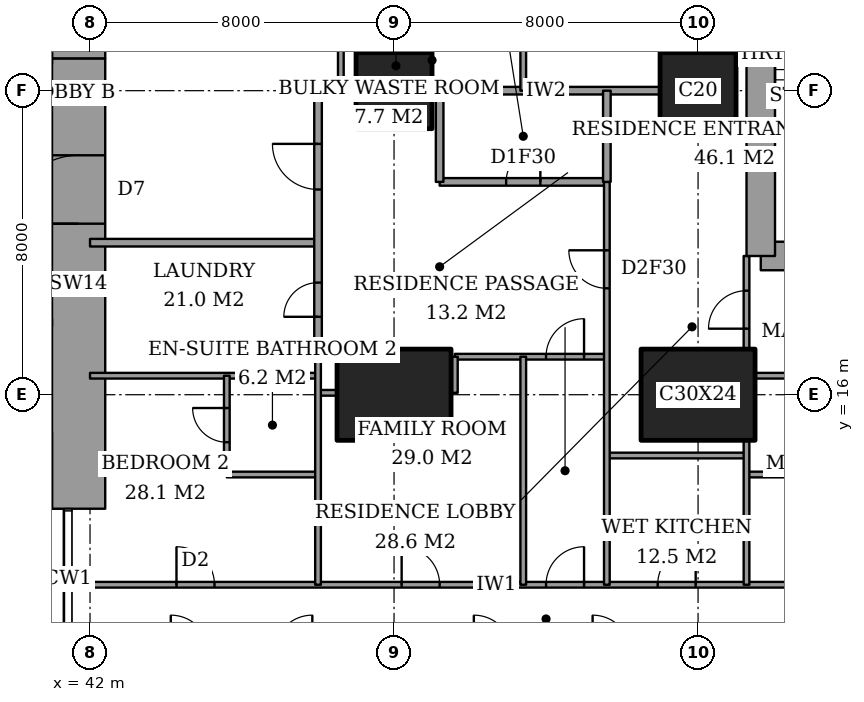
"""IFC4 building model, lengths in metres.
Left out: names, types, materials, properties, quantities, classifications, styles, units other than length and angle.
Written with IfcOpenShell. Run it as: python <this file> out.ifc"""

import sys

from ifc_helpers import new_model, si_unit, direction, frame, frame_2d, origin, origin_2d, place, context, subcontext, project, spatial, rectangle, extrude, element, fill, save


model = new_model("IFC4")
c1 = context("Model", 3, precision=1e-05, world=origin(), true_north=direction((0.0, 1.0)))
c2 = subcontext(c1, "Body", "Model", "MODEL_VIEW")
j1 = project(units=[si_unit("LENGTHUNIT", "METRE"), si_unit("PLANEANGLEUNIT", "RADIAN")], contexts=[c1])
p1 = place(None, origin())
s1 = spatial("IfcSite", under=j1, at=p1, CompositionType="ELEMENT")
p2 = place(p1, origin())
s2 = spatial("IfcBuilding", under=s1, at=p2, CompositionType="ELEMENT")
p3 = place(p2, frame((0.0, 0.0, 121.4)))
s3 = spatial("IfcBuildingStorey", under=s2, at=p3, CompositionType="ELEMENT", Elevation=121.4)
p4 = place(p3, frame((50.0, 16.0, 0.0), z_axis=(0.0, 0.0, 1.0), x_axis=(1.0, 0.0, 0.0)))
e1 = element("IfcColumn", 1, at=p4, inside=s3, PredefinedType="COLUMN", context=c2, shape_type="SweptSolid", body=[
    extrude(rectangle(XDim=3.0, YDim=2.4, at=origin_2d()), origin(), (0.0, 0.0, 1.0), 3.6),
])
p5 = place(p3, frame((50.0, 24.0, 0.0), z_axis=(0.0, 0.0, 1.0), x_axis=(1.0, 0.0, 0.0)))
e2 = element("IfcColumn", 2, at=p5, inside=s3, PredefinedType="COLUMN", context=c2, shape_type="SweptSolid", body=[
    extrude(rectangle(XDim=2.0, YDim=2.0, at=origin_2d()), origin(), (0.0, 0.0, 1.0), 3.6),
])
p6 = place(p3, frame((58.0, 16.0, 0.0), z_axis=(0.0, 0.0, 1.0), x_axis=(1.0, 0.0, 0.0)))
e3 = element("IfcColumn", 3, at=p6, inside=s3, PredefinedType="COLUMN", context=c2, shape_type="SweptSolid", body=[
    extrude(rectangle(XDim=3.0, YDim=2.4, at=origin_2d()), origin(), (0.0, 0.0, 1.0), 3.6),
])
p7 = place(p3, frame((58.0, 24.0, 0.0), z_axis=(0.0, 0.0, 1.0), x_axis=(1.0, 0.0, 0.0)))
e4 = element("IfcColumn", 4, at=p7, inside=s3, PredefinedType="COLUMN", context=c2, shape_type="SweptSolid", body=[
    extrude(rectangle(XDim=2.0, YDim=2.0, at=origin_2d()), origin(), (0.0, 0.0, 1.0), 3.6),
])
p8 = place(p3, frame((41.7, 13.0, 0.0), z_axis=(0.0, 0.0, 1.0), x_axis=(0.0, 1.0, 0.0)))
e5 = element("IfcWall", 5, at=p8, inside=s3, PredefinedType="SHEAR", context=c2, shape_type="SweptSolid", body=[
    extrude(rectangle(XDim=11.85, YDim=1.4, at=frame_2d((5.925, 0.0))), origin(), (0.0, 0.0, 1.0), 3.6),
])
p9 = place(p8, frame((7.5, 0.0, 0.0)))
e6 = element("IfcOpeningElement", 6, at=p9, cuts=e5, PredefinedType="OPENING", context=c2, shape_type="SweptSolid", body=[
    extrude(rectangle(XDim=1.8, YDim=2.4, at=frame_2d((0.9, 1.2))), frame((0.0, 0.71, 0.0), z_axis=(0.0, -1.0, 0.0), x_axis=(1.0, 0.0, 0.0)), (0.0, 0.0, 1.0), 1.42),
])
p10 = place(p3, frame((41.7, 24.85, 0.0), z_axis=(0.0, 0.0, 1.0), x_axis=(0.0, 1.0, 0.0)))
e7 = element("IfcWall", 7, at=p10, inside=s3, PredefinedType="SHEAR", context=c2, shape_type="SweptSolid", body=[
    extrude(rectangle(XDim=10.15, YDim=1.4, at=frame_2d((5.075, 0.0))), origin(), (0.0, 0.0, 1.0), 3.6),
])
p11 = place(p3, frame((59.65, 19.65, 0.0), z_axis=(0.0, 0.0, 1.0), x_axis=(1.0, 0.0, 0.0)))
e8 = element("IfcWall", 8, at=p11, inside=s3, PredefinedType="SHEAR", context=c2, shape_type="SweptSolid", body=[
    extrude(rectangle(XDim=4.45, YDim=0.75, at=frame_2d((2.225, 0.0))), origin(), (0.0, 0.0, 1.0), 3.6),
])
p12 = place(p3, frame((59.65, 28.35, 0.0), z_axis=(0.0, 0.0, 1.0), x_axis=(0.0, -1.0, 0.0)))
e9 = element("IfcWall", 9, at=p12, inside=s3, PredefinedType="SHEAR", context=c2, shape_type="SweptSolid", body=[
    extrude(rectangle(XDim=8.7, YDim=0.75, at=frame_2d((4.35, 0.0))), origin(), (0.0, 0.0, 1.0), 3.6),
])
p13 = place(p12, frame((0.975, 0.0, 0.0)))
e10 = element("IfcOpeningElement", 10, at=p13, cuts=e9, PredefinedType="OPENING", context=c2, shape_type="SweptSolid", body=[
    extrude(rectangle(XDim=1.0, YDim=2.1, at=frame_2d((0.5, 1.05))), frame((0.0, 0.385, 0.0), z_axis=(0.0, -1.0, 0.0), x_axis=(1.0, 0.0, 0.0)), (0.0, 0.0, 1.0), 0.77),
])
p14 = place(p3, frame((41.439, 11.0, 0.0), z_axis=(0.0, 0.0, 1.0), x_axis=(1.0, 0.0, 0.0)))
e11 = element("IfcWall", 11, at=p14, inside=s3, PredefinedType="PARTITIONING", context=c2, shape_type="SweptSolid", body=[
    extrude(rectangle(XDim=25.011, YDim=0.15, at=frame_2d((12.505, 0.0))), origin(), (0.0, 0.0, 1.0), 3.35),
])
p15 = place(p14, frame((12.561, 0.0, 0.0)))
e12 = element("IfcOpeningElement", 12, at=p15, cuts=e11, PredefinedType="OPENING", context=c2, shape_type="SweptSolid", body=[
    extrude(rectangle(XDim=1.0, YDim=2.1, at=frame_2d((0.5, 1.05))), frame((0.0, 0.085, 0.0), z_axis=(0.0, -1.0, 0.0), x_axis=(1.0, 0.0, 0.0)), (0.0, 0.0, 1.0), 0.17),
])
p16 = place(p14, frame((20.924, 0.0, 0.0)))
e13 = element("IfcOpeningElement", 13, at=p16, cuts=e11, PredefinedType="OPENING", context=c2, shape_type="SweptSolid", body=[
    extrude(rectangle(XDim=1.0, YDim=2.1, at=frame_2d((0.5, 1.05))), frame((0.0, 0.085, 0.0), z_axis=(0.0, -1.0, 0.0), x_axis=(1.0, 0.0, 0.0)), (0.0, 0.0, 1.0), 0.17),
])
p17 = place(p14, frame((15.499, 0.0, 0.0)))
e14 = element("IfcOpeningElement", 14, at=p17, cuts=e11, PredefinedType="OPENING", context=c2, shape_type="SweptSolid", body=[
    extrude(rectangle(XDim=1.0, YDim=2.1, at=frame_2d((0.5, 1.05))), frame((0.0, 0.085, 0.0), z_axis=(0.0, -1.0, 0.0), x_axis=(1.0, 0.0, 0.0)), (0.0, 0.0, 1.0), 0.17),
])
p18 = place(p14, frame((8.761, 0.0, 0.0)))
e15 = element("IfcOpeningElement", 15, at=p18, cuts=e11, PredefinedType="OPENING", context=c2, shape_type="SweptSolid", body=[
    extrude(rectangle(XDim=1.0, YDim=2.1, at=frame_2d((0.5, 1.05))), frame((0.0, 0.085, 0.0), z_axis=(0.0, -1.0, 0.0), x_axis=(1.0, 0.0, 0.0)), (0.0, 0.0, 1.0), 0.17),
])
p19 = place(p14, frame((2.836, 0.0, 0.0)))
e16 = element("IfcOpeningElement", 16, at=p19, cuts=e11, PredefinedType="OPENING", context=c2, shape_type="SweptSolid", body=[
    extrude(rectangle(XDim=1.0, YDim=2.1, at=frame_2d((0.5, 1.05))), frame((0.0, 0.085, 0.0), z_axis=(0.0, -1.0, 0.0), x_axis=(1.0, 0.0, 0.0)), (0.0, 0.0, 1.0), 0.17),
])
p20 = place(p3, frame((45.6, 13.9, 0.0), z_axis=(0.0, 0.0, 1.0), x_axis=(1.0, 0.0, 0.0)))
e17 = element("IfcWall", 17, at=p20, inside=s3, PredefinedType="PARTITIONING", context=c2, shape_type="SweptSolid", body=[
    extrude(rectangle(XDim=2.4, YDim=0.15, at=frame_2d((1.2, 0.0))), origin(), (0.0, 0.0, 1.0), 3.35),
])
p21 = place(p3, frame((59.275, 13.9, 0.0), z_axis=(0.0, 0.0, 1.0), x_axis=(1.0, 0.0, 0.0)))
e18 = element("IfcWall", 18, at=p21, inside=s3, PredefinedType="PARTITIONING", context=c2, shape_type="SweptSolid", body=[
    extrude(rectangle(XDim=2.4, YDim=0.15, at=frame_2d((1.2, 0.0))), origin(), (0.0, 0.0, 1.0), 3.35),
])
p22 = place(p3, frame((55.6, 14.4, 0.0), z_axis=(0.0, 0.0, 1.0), x_axis=(1.0, 0.0, 0.0)))
e19 = element("IfcWall", 19, at=p22, inside=s3, PredefinedType="PARTITIONING", context=c2, shape_type="SweptSolid", body=[
    extrude(rectangle(XDim=3.675, YDim=0.15, at=frame_2d((1.837, 0.0))), origin(), (0.0, 0.0, 1.0), 3.35),
])
p23 = place(p3, frame((48.0, 16.05, 0.0), z_axis=(0.0, 0.0, 1.0), x_axis=(1.0, 0.0, 0.0)))
e20 = element("IfcWall", 20, at=p23, inside=s3, PredefinedType="PARTITIONING", context=c2, shape_type="SweptSolid", body=[
    extrude(rectangle(XDim=0.5, YDim=0.15, at=frame_2d((0.25, 0.0))), origin(), (0.0, 0.0, 1.0), 2.634),
])
p24 = place(p3, frame((42.0, 16.5, 0.0), z_axis=(0.0, 0.0, 1.0), x_axis=(1.0, 0.0, 0.0)))
e21 = element("IfcWall", 21, at=p24, inside=s3, PredefinedType="PARTITIONING", context=c2, shape_type="SweptSolid", body=[
    extrude(rectangle(XDim=6.0, YDim=0.15, at=frame_2d((3.0, 0.0))), origin(), (0.0, 0.0, 1.0), 3.35),
])
p25 = place(p3, frame((59.5, 16.5, 0.0), z_axis=(0.0, 0.0, 1.0), x_axis=(1.0, 0.0, 0.0)))
e22 = element("IfcWall", 22, at=p25, inside=s3, PredefinedType="PARTITIONING", context=c2, shape_type="SweptSolid", body=[
    extrude(rectangle(XDim=5.15, YDim=0.15, at=frame_2d((2.575, 0.0))), origin(), (0.0, 0.0, 1.0), 3.35),
])
p26 = place(p3, frame((51.6, 17.0, 0.0), z_axis=(0.0, 0.0, 1.0), x_axis=(1.0, 0.0, 0.0)))
e23 = element("IfcWall", 23, at=p26, inside=s3, PredefinedType="PARTITIONING", context=c2, shape_type="SweptSolid", body=[
    extrude(rectangle(XDim=4.0, YDim=0.15, at=frame_2d((2.0, 0.0))), origin(), (0.0, 0.0, 1.0), 3.35),
])
p27 = place(p26, frame((2.4, 0.0, 0.0)))
e24 = element("IfcOpeningElement", 24, at=p27, cuts=e23, PredefinedType="OPENING", context=c2, shape_type="SweptSolid", body=[
    extrude(rectangle(XDim=1.0, YDim=2.1, at=frame_2d((0.5, 1.05))), frame((0.0, 0.085, 0.0), z_axis=(0.0, -1.0, 0.0), x_axis=(1.0, 0.0, 0.0)), (0.0, 0.0, 1.0), 0.17),
])
p28 = place(p3, frame((42.0, 20.0, 0.0), z_axis=(0.0, 0.0, 1.0), x_axis=(1.0, 0.0, 0.0)))
e25 = element("IfcWall", 25, at=p28, inside=s3, PredefinedType="PARTITIONING", context=c2, shape_type="SweptSolid", body=[
    extrude(rectangle(XDim=6.0, YDim=0.2, at=frame_2d((3.0, 0.0))), origin(), (0.0, 0.0, 1.0), 3.35),
])
p29 = place(p3, frame((51.2, 21.6, 0.0), z_axis=(0.0, 0.0, 1.0), x_axis=(1.0, 0.0, 0.0)))
e26 = element("IfcWall", 26, at=p29, inside=s3, PredefinedType="PARTITIONING", context=c2, shape_type="SweptSolid", body=[
    extrude(rectangle(XDim=4.4, YDim=0.2, at=frame_2d((2.2, 0.0))), origin(), (0.0, 0.0, 1.0), 3.35),
])
p30 = place(p29, frame((1.75, 0.0, 0.0)))
e27 = element("IfcOpeningElement", 27, at=p30, cuts=e26, PredefinedType="OPENING", context=c2, shape_type="SweptSolid", body=[
    extrude(rectangle(XDim=0.9, YDim=2.1, at=frame_2d((0.45, 1.05))), frame((0.0, 0.11, 0.0), z_axis=(0.0, -1.0, 0.0), x_axis=(1.0, 0.0, 0.0)), (0.0, 0.0, 1.0), 0.22),
])
p31 = place(p3, frame((48.0, 24.0, 0.0), z_axis=(0.0, 0.0, 1.0), x_axis=(1.0, 0.0, 0.0)))
e28 = element("IfcWall", 28, at=p31, inside=s3, PredefinedType="PARTITIONING", context=c2, shape_type="SweptSolid", body=[
    extrude(rectangle(XDim=1.0, YDim=0.2, at=frame_2d((0.5, 0.0))), origin(), (0.0, 0.0, 1.0), 3.35),
])
p32 = place(p3, frame((51.0, 24.0, 0.0), z_axis=(0.0, 0.0, 1.0), x_axis=(1.0, 0.0, 0.0)))
e29 = element("IfcWall", 29, at=p32, inside=s3, PredefinedType="PARTITIONING", context=c2, shape_type="SweptSolid", body=[
    extrude(rectangle(XDim=6.0, YDim=0.2, at=frame_2d((3.0, 0.0))), origin(), (0.0, 0.0, 1.0), 3.35),
])
p33 = place(p3, frame((45.6, 13.9, 0.0), z_axis=(0.0, 0.0, 1.0), x_axis=(0.0, 1.0, 0.0)))
e30 = element("IfcWall", 30, at=p33, inside=s3, PredefinedType="PARTITIONING", context=c2, shape_type="SweptSolid", body=[
    extrude(rectangle(XDim=2.6, YDim=0.15, at=frame_2d((1.3, 0.0))), origin(), (0.0, 0.0, 1.0), 3.35),
])
p34 = place(p33, frame((0.85, 0.0, 0.0)))
e31 = element("IfcOpeningElement", 31, at=p34, cuts=e30, PredefinedType="OPENING", context=c2, shape_type="SweptSolid", body=[
    extrude(rectangle(XDim=0.9, YDim=2.1, at=frame_2d((0.45, 1.05))), frame((0.0, 0.085, 0.0), z_axis=(0.0, -1.0, 0.0), x_axis=(1.0, 0.0, 0.0)), (0.0, 0.0, 1.0), 0.17),
])
p35 = place(p3, frame((48.0, 17.0, 0.0), z_axis=(0.0, 0.0, 1.0), x_axis=(0.0, 1.0, 0.0)))
e32 = element("IfcWall", 32, at=p35, inside=s3, PredefinedType="PARTITIONING", context=c2, shape_type="SweptSolid", body=[
    extrude(rectangle(XDim=7.0, YDim=0.2, at=frame_2d((3.5, 0.0))), origin(), (0.0, 0.0, 1.0), 3.35),
])
p36 = place(p35, frame((4.4, 0.0, 0.0)))
e33 = element("IfcOpeningElement", 33, at=p36, cuts=e32, PredefinedType="OPENING", context=c2, shape_type="SweptSolid", body=[
    extrude(rectangle(XDim=1.2, YDim=2.4, at=frame_2d((0.6, 1.2))), frame((0.0, 0.11, 0.0), z_axis=(0.0, -1.0, 0.0), x_axis=(1.0, 0.0, 0.0)), (0.0, 0.0, 1.0), 0.22),
])
p37 = place(p35, frame((1.05, 0.0, 0.0)))
e34 = element("IfcOpeningElement", 34, at=p37, cuts=e32, PredefinedType="OPENING", context=c2, shape_type="SweptSolid", body=[
    extrude(rectangle(XDim=0.9, YDim=2.1, at=frame_2d((0.45, 1.05))), frame((0.0, 0.11, 0.0), z_axis=(0.0, -1.0, 0.0), x_axis=(1.0, 0.0, 0.0)), (0.0, 0.0, 1.0), 0.22),
])
p38 = place(p3, frame((48.0, 11.0, 0.0), z_axis=(0.0, 0.0, 1.0), x_axis=(0.0, 1.0, 0.0)))
e35 = element("IfcWall", 35, at=p38, inside=s3, PredefinedType="PARTITIONING", context=c2, shape_type="SweptSolid", body=[
    extrude(rectangle(XDim=6.0, YDim=0.15, at=frame_2d((3.0, 0.0))), origin(), (0.0, 0.0, 1.0), 3.35),
])
p39 = place(p3, frame((48.6, 24.0, 0.0), z_axis=(0.0, 0.0, 1.0), x_axis=(0.0, 1.0, 0.0)))
e36 = element("IfcWall", 36, at=p39, inside=s3, PredefinedType="PARTITIONING", context=c2, shape_type="SweptSolid", body=[
    extrude(rectangle(XDim=1.6, YDim=0.15, at=frame_2d((0.8, 0.0))), origin(), (0.0, 0.0, 1.0), 3.35),
])
p40 = place(p3, frame((51.2, 21.6, 0.0), z_axis=(0.0, 0.0, 1.0), x_axis=(0.0, 1.0, 0.0)))
e37 = element("IfcWall", 37, at=p40, inside=s3, PredefinedType="PARTITIONING", context=c2, shape_type="SweptSolid", body=[
    extrude(rectangle(XDim=2.4, YDim=0.2, at=frame_2d((1.2, 0.0))), origin(), (0.0, 0.0, 1.0), 3.35),
])
p41 = place(p3, frame((51.6, 16.05, 0.0), z_axis=(0.0, 0.0, 1.0), x_axis=(0.0, 1.0, 0.0)))
e38 = element("IfcWall", 38, at=p41, inside=s3, PredefinedType="PARTITIONING", context=c2, shape_type="SweptSolid", body=[
    extrude(rectangle(XDim=0.95, YDim=0.15, at=frame_2d((0.475, 0.0))), origin(), (0.0, 0.0, 1.0), 3.35),
])
p42 = place(p3, frame((53.4, 11.0, 0.0), z_axis=(0.0, 0.0, 1.0), x_axis=(0.0, 1.0, 0.0)))
e39 = element("IfcWall", 39, at=p42, inside=s3, PredefinedType="PARTITIONING", context=c2, shape_type="SweptSolid", body=[
    extrude(rectangle(XDim=6.0, YDim=0.15, at=frame_2d((3.0, 0.0))), origin(), (0.0, 0.0, 1.0), 3.35),
])
p43 = place(p3, frame((53.4, 24.0, 0.0), z_axis=(0.0, 0.0, 1.0), x_axis=(0.0, 1.0, 0.0)))
e40 = element("IfcWall", 40, at=p43, inside=s3, PredefinedType="PARTITIONING", context=c2, shape_type="SweptSolid", body=[
    extrude(rectangle(XDim=1.6, YDim=0.15, at=frame_2d((0.8, 0.0))), origin(), (0.0, 0.0, 1.0), 3.35),
])
p44 = place(p3, frame((55.6, 21.6, 0.0), z_axis=(0.0, 0.0, 1.0), x_axis=(0.0, 1.0, 0.0)))
e41 = element("IfcWall", 41, at=p44, inside=s3, PredefinedType="PARTITIONING", context=c2, shape_type="SweptSolid", body=[
    extrude(rectangle(XDim=2.4, YDim=0.2, at=frame_2d((1.2, 0.0))), origin(), (0.0, 0.0, 1.0), 3.35),
])
p45 = place(p3, frame((55.6, 11.0, 0.0), z_axis=(0.0, 0.0, 1.0), x_axis=(0.0, 1.0, 0.0)))
e42 = element("IfcWall", 42, at=p45, inside=s3, PredefinedType="PARTITIONING", context=c2, shape_type="SweptSolid", body=[
    extrude(rectangle(XDim=10.6, YDim=0.15, at=frame_2d((5.3, 0.0))), origin(), (0.0, 0.0, 1.0), 3.35),
])
p46 = place(p45, frame((7.8, 0.0, 0.0)))
e43 = element("IfcOpeningElement", 43, at=p46, cuts=e42, PredefinedType="OPENING", context=c2, shape_type="SweptSolid", body=[
    extrude(rectangle(XDim=1.0, YDim=2.1, at=frame_2d((0.5, 1.05))), frame((0.0, 0.085, 0.0), z_axis=(0.0, -1.0, 0.0), x_axis=(1.0, 0.0, 0.0)), (0.0, 0.0, 1.0), 0.17),
])
p47 = place(p3, frame((59.275, 11.0, 0.0), z_axis=(0.0, 0.0, 1.0), x_axis=(0.0, 1.0, 0.0)))
e44 = element("IfcWall", 44, at=p47, inside=s3, PredefinedType="PARTITIONING", context=c2, shape_type="SweptSolid", body=[
    extrude(rectangle(XDim=3.8, YDim=0.15, at=frame_2d((1.9, 0.0))), origin(), (0.0, 0.0, 1.0), 3.35),
])
p48 = place(p3, frame((59.275, 17.2, 0.0), z_axis=(0.0, 0.0, 1.0), x_axis=(0.0, 1.0, 0.0)))
e45 = element("IfcWall", 45, at=p48, inside=s3, PredefinedType="PARTITIONING", context=c2, shape_type="SweptSolid", body=[
    extrude(rectangle(XDim=2.45, YDim=0.15, at=frame_2d((1.225, 0.0))), origin(), (0.0, 0.0, 1.0), 3.35),
])
p49 = place(p48, frame((0.538, 0.0, 0.0)))
e46 = element("IfcOpeningElement", 46, at=p49, cuts=e45, PredefinedType="OPENING", context=c2, shape_type="SweptSolid", body=[
    extrude(rectangle(XDim=1.0, YDim=2.1, at=frame_2d((0.5, 1.05))), frame((0.0, 0.085, 0.0), z_axis=(0.0, -1.0, 0.0), x_axis=(1.0, 0.0, 0.0)), (0.0, 0.0, 1.0), 0.17),
])
p50 = place(p3, frame((28.3, 17.9, 0.0), z_axis=(0.0, 0.0, 1.0), x_axis=(1.0, 0.0, 0.0)))
e47 = element("IfcWall", 47, at=p50, inside=s3, PredefinedType="PARTITIONING", context=c2, shape_type="SweptSolid", body=[
    extrude(rectangle(XDim=12.7, YDim=0.2, at=frame_2d((6.35, 0.0))), origin(), (0.0, 0.0, 1.0), 3.6),
])
p51 = place(p50, frame((0.95, 0.0, 0.0)))
e48 = element("IfcOpeningElement", 48, at=p51, cuts=e47, PredefinedType="OPENING", context=c2, shape_type="SweptSolid", body=[
    extrude(rectangle(XDim=1.1, YDim=2.1, at=frame_2d((0.55, 1.05))), frame((0.0, 0.11, 0.0), z_axis=(0.0, -1.0, 0.0), x_axis=(1.0, 0.0, 0.0)), (0.0, 0.0, 1.0), 0.22),
])
p52 = place(p50, frame((4.15, 0.0, 0.0)))
e49 = element("IfcOpeningElement", 49, at=p52, cuts=e47, PredefinedType="OPENING", context=c2, shape_type="SweptSolid", body=[
    extrude(rectangle(XDim=1.1, YDim=2.1, at=frame_2d((0.55, 1.05))), frame((0.0, 0.11, 0.0), z_axis=(0.0, -1.0, 0.0), x_axis=(1.0, 0.0, 0.0)), (0.0, 0.0, 1.0), 0.22),
])
p53 = place(p50, frame((7.35, 0.0, 0.0)))
e50 = element("IfcOpeningElement", 50, at=p53, cuts=e47, PredefinedType="OPENING", context=c2, shape_type="SweptSolid", body=[
    extrude(rectangle(XDim=1.1, YDim=2.1, at=frame_2d((0.55, 1.05))), frame((0.0, 0.11, 0.0), z_axis=(0.0, -1.0, 0.0), x_axis=(1.0, 0.0, 0.0)), (0.0, 0.0, 1.0), 0.22),
])
p54 = place(p50, frame((10.6, 0.0, 0.0)))
e51 = element("IfcOpeningElement", 51, at=p54, cuts=e47, PredefinedType="OPENING", context=c2, shape_type="SweptSolid", body=[
    extrude(rectangle(XDim=1.2, YDim=2.1, at=frame_2d((0.6, 1.05))), frame((0.0, 0.11, 0.0), z_axis=(0.0, -1.0, 0.0), x_axis=(1.0, 0.0, 0.0)), (0.0, 0.0, 1.0), 0.22),
])
p55 = place(p15, origin())
e52 = element("IfcDoor", 52, at=p55, inside=s3, OperationType="SINGLE_SWING_LEFT", PredefinedType="DOOR", context=c2, shape_type="SweptSolid", body=[
    extrude(rectangle(XDim=1.0, YDim=2.1, at=frame_2d((0.5, 1.05))), frame((0.0, 0.025, 0.0), z_axis=(0.0, -1.0, 0.0), x_axis=(1.0, 0.0, 0.0)), (0.0, 0.0, 1.0), 0.05),
])
fill(e12, e52)
p56 = place(p49, origin())
e53 = element("IfcDoor", 53, at=p56, inside=s3, OperationType="SINGLE_SWING_RIGHT", PredefinedType="DOOR", context=c2, shape_type="SweptSolid", body=[
    extrude(rectangle(XDim=1.0, YDim=2.1, at=frame_2d((0.5, 1.05))), frame((0.0, 0.025, 0.0), z_axis=(0.0, -1.0, 0.0), x_axis=(1.0, 0.0, 0.0)), (0.0, 0.0, 1.0), 0.05),
])
fill(e46, e53)
p57 = place(p17, origin())
e54 = element("IfcDoor", 54, at=p57, inside=s3, OperationType="SINGLE_SWING_LEFT", PredefinedType="DOOR", context=c2, shape_type="SweptSolid", body=[
    extrude(rectangle(XDim=1.0, YDim=2.1, at=frame_2d((0.5, 1.05))), frame((0.0, 0.025, 0.0), z_axis=(0.0, -1.0, 0.0), x_axis=(1.0, 0.0, 0.0)), (0.0, 0.0, 1.0), 0.05),
])
fill(e14, e54)
p58 = place(p46, origin())
e55 = element("IfcDoor", 55, at=p58, inside=s3, OperationType="SINGLE_SWING_LEFT", PredefinedType="DOOR", context=c2, shape_type="SweptSolid", body=[
    extrude(rectangle(XDim=1.0, YDim=2.1, at=frame_2d((0.5, 1.05))), frame((0.0, 0.025, 0.0), z_axis=(0.0, -1.0, 0.0), x_axis=(1.0, 0.0, 0.0)), (0.0, 0.0, 1.0), 0.05),
])
fill(e43, e55)
p59 = place(p30, origin())
e56 = element("IfcDoor", 56, at=p59, inside=s3, OperationType="SINGLE_SWING_LEFT", PredefinedType="DOOR", context=c2, shape_type="SweptSolid", body=[
    extrude(rectangle(XDim=0.9, YDim=2.1, at=frame_2d((0.45, 1.05))), frame((0.0, 0.025, 0.0), z_axis=(0.0, -1.0, 0.0), x_axis=(1.0, 0.0, 0.0)), (0.0, 0.0, 1.0), 0.05),
])
fill(e27, e56)
p60 = place(p36, origin())
e57 = element("IfcDoor", 57, at=p60, inside=s3, OperationType="SINGLE_SWING_LEFT", PredefinedType="DOOR", context=c2, shape_type="SweptSolid", body=[
    extrude(rectangle(XDim=1.2, YDim=2.4, at=frame_2d((0.6, 1.2))), frame((0.0, 0.025, 0.0), z_axis=(0.0, -1.0, 0.0), x_axis=(1.0, 0.0, 0.0)), (0.0, 0.0, 1.0), 0.05),
])
fill(e33, e57)
p61 = place(p27, origin())
e58 = element("IfcDoor", 58, at=p61, inside=s3, OperationType="SINGLE_SWING_LEFT", PredefinedType="DOOR", context=c2, shape_type="SweptSolid", body=[
    extrude(rectangle(XDim=1.0, YDim=2.1, at=frame_2d((0.5, 1.05))), frame((0.0, 0.025, 0.0), z_axis=(0.0, -1.0, 0.0), x_axis=(1.0, 0.0, 0.0)), (0.0, 0.0, 1.0), 0.05),
])
fill(e24, e58)
p62 = place(p18, origin())
e59 = element("IfcDoor", 59, at=p62, inside=s3, OperationType="SINGLE_SWING_RIGHT", PredefinedType="DOOR", context=c2, shape_type="SweptSolid", body=[
    extrude(rectangle(XDim=1.0, YDim=2.1, at=frame_2d((0.5, 1.05))), frame((0.0, 0.025, 0.0), z_axis=(0.0, -1.0, 0.0), x_axis=(1.0, 0.0, 0.0)), (0.0, 0.0, 1.0), 0.05),
])
fill(e15, e59)
p63 = place(p34, origin())
e60 = element("IfcDoor", 60, at=p63, inside=s3, OperationType="SINGLE_SWING_LEFT", PredefinedType="DOOR", context=c2, shape_type="SweptSolid", body=[
    extrude(rectangle(XDim=0.9, YDim=2.1, at=frame_2d((0.45, 1.05))), frame((0.0, 0.025, 0.0), z_axis=(0.0, -1.0, 0.0), x_axis=(1.0, 0.0, 0.0)), (0.0, 0.0, 1.0), 0.05),
])
fill(e31, e60)
p64 = place(p19, origin())
e61 = element("IfcDoor", 61, at=p64, inside=s3, OperationType="SINGLE_SWING_RIGHT", PredefinedType="DOOR", context=c2, shape_type="SweptSolid", body=[
    extrude(rectangle(XDim=1.0, YDim=2.1, at=frame_2d((0.5, 1.05))), frame((0.0, 0.025, 0.0), z_axis=(0.0, -1.0, 0.0), x_axis=(1.0, 0.0, 0.0)), (0.0, 0.0, 1.0), 0.05),
])
fill(e16, e61)
p65 = place(p37, origin())
e62 = element("IfcDoor", 62, at=p65, inside=s3, OperationType="SINGLE_SWING_RIGHT", PredefinedType="DOOR", context=c2, shape_type="SweptSolid", body=[
    extrude(rectangle(XDim=0.9, YDim=2.1, at=frame_2d((0.45, 1.05))), frame((0.0, 0.025, 0.0), z_axis=(0.0, -1.0, 0.0), x_axis=(1.0, 0.0, 0.0)), (0.0, 0.0, 1.0), 0.05),
])
fill(e34, e62)
p66 = place(p9, origin())
e63 = element("IfcDoor", 63, at=p66, inside=s3, OperationType="DOUBLE_DOOR_DOUBLE_SWING", PredefinedType="DOOR", context=c2, shape_type="SweptSolid", body=[
    extrude(rectangle(XDim=1.8, YDim=2.4, at=frame_2d((0.9, 1.2))), frame((0.0, 0.025, 0.0), z_axis=(0.0, -1.0, 0.0), x_axis=(1.0, 0.0, 0.0)), (0.0, 0.0, 1.0), 0.05),
])
fill(e6, e63)
save(model, sys.argv[1])
